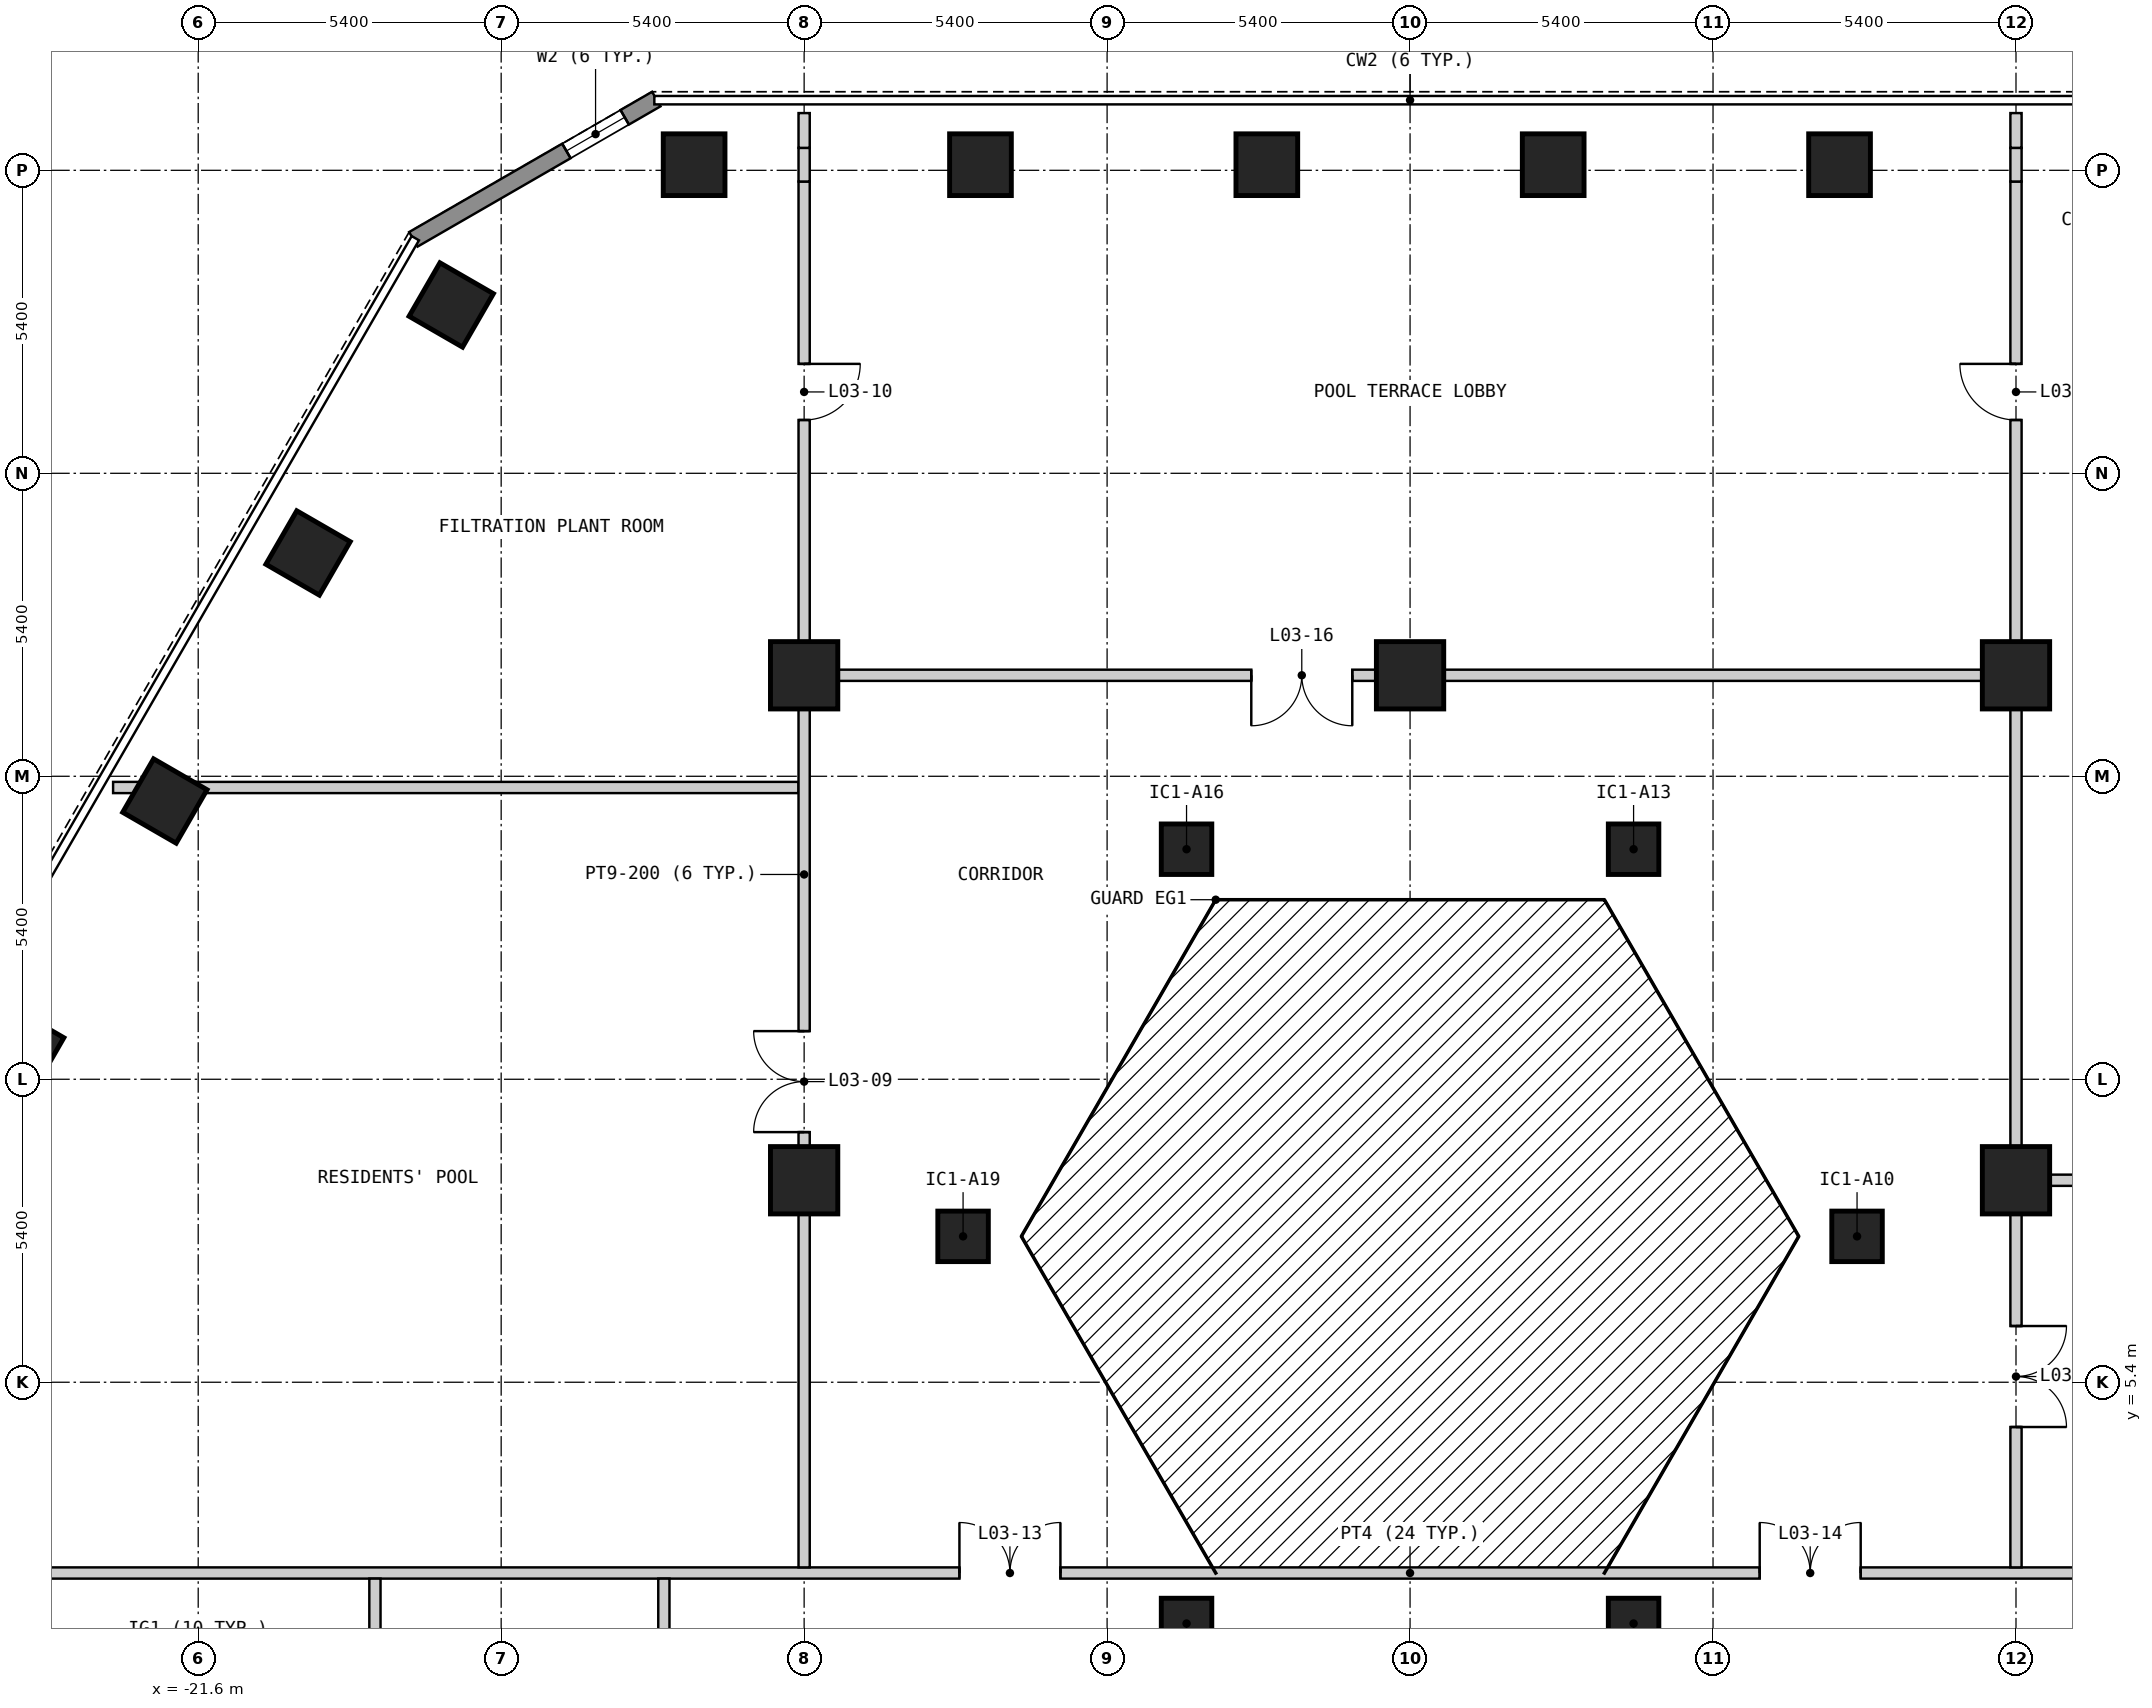
"""IFC4 building model, lengths in metres.
Left out: names, types, materials, properties, quantities, classifications, styles, units other than length and angle.
Written with IfcOpenShell. Run it as: python <this file> out.ifc"""

import sys

from ifc_helpers import new_model, si_unit, direction, frame, frame_2d, origin, origin_2d, place, context, subcontext, project, spatial, polyline, rectangle, outline, extrude, element, fill, save


model = new_model("IFC4")
c1 = context("Model", 3, precision=1e-05, world=origin(), true_north=direction((0.0, 1.0)))
c2 = subcontext(c1, "Body", "Model", "MODEL_VIEW")
j1 = project(units=[si_unit("LENGTHUNIT", "METRE"), si_unit("PLANEANGLEUNIT", "RADIAN")], contexts=[c1])
p1 = place(None, origin())
s1 = spatial("IfcSite", under=j1, at=p1, CompositionType="ELEMENT")
p2 = place(p1, origin())
s2 = spatial("IfcBuilding", under=s1, at=p2, CompositionType="ELEMENT")
p3 = place(p2, frame((0.0, 0.0, 12.6)))
s3 = spatial("IfcBuildingStorey", under=s2, at=p3, CompositionType="ELEMENT", Elevation=12.6)
for number, where, z_axis, x_axis in (
    (1, (7.655, 27.1, 0.0), (0.0, 0.0, 1.0), (-1.0, 0.0, 0.0)),
    (2, (2.551, 27.1, 0.0), (0.0, 0.0, 1.0), (-1.0, 0.0, 0.0)),
    (3, (-2.553, 27.1, 0.0), (0.0, 0.0, 1.0), (-1.0, 0.0, 0.0)),
    (4, (-7.657, 27.1, 0.0), (0.0, 0.0, 1.0), (-1.0, 0.0, 0.0)),
    (5, (-12.761, 27.1, 0.0), (0.0, 0.0, 1.0), (-1.0, 0.0, 0.0)),
    (6, (-17.09, 24.6, 0.0), (0.0, 0.0, 1.0), (-0.5, -0.866, 0.0)),
    (7, (-19.642, 20.18, 0.0), (0.0, 0.0, 1.0), (-0.5, -0.866, 0.0)),
    (8, (-22.194, 15.759, 0.0), (0.0, 0.0, 1.0), (-0.5, -0.866, 0.0)),
    (9, (-24.746, 11.339, 0.0), (0.0, 0.0, 1.0), (-0.5, -0.866, 0.0)),
):
    element("IfcColumn", number, at=place(p3, frame(where, z_axis=z_axis, x_axis=x_axis)), inside=s3, PredefinedType="COLUMN", context=c2, shape_type="SweptSolid", body=[
        extrude(rectangle(XDim=1.1, YDim=1.1, at=origin_2d()), origin(), (0.0, 0.0, 1.0), 3.6),
    ])
for number, where, z_axis, x_axis in (
    (10, (3.984, 1.1, 0.0), (0.0, 0.0, 1.0), (1.0, 0.0, 0.0)),
    (11, (7.967, 8.0, 0.0), (0.0, 0.0, 1.0), (1.0, 0.0, 0.0)),
    (12, (3.984, 14.9, 0.0), (0.0, 0.0, 1.0), (1.0, 0.0, 0.0)),
    (13, (-3.984, 14.9, 0.0), (0.0, 0.0, 1.0), (1.0, 0.0, 0.0)),
    (14, (-7.967, 8.0, 0.0), (0.0, 0.0, 1.0), (1.0, 0.0, 0.0)),
    (15, (-3.984, 1.1, 0.0), (0.0, 0.0, 1.0), (1.0, 0.0, 0.0)),
):
    element("IfcColumn", number, at=place(p3, frame(where, z_axis=z_axis, x_axis=x_axis)), inside=s3, PredefinedType="COLUMN", context=c2, shape_type="SweptSolid", body=[
        extrude(rectangle(XDim=0.9, YDim=0.9, at=origin_2d()), origin(), (0.0, 0.0, 1.0), 3.6),
    ])
for number, where, z_axis, x_axis in (
    (16, (-10.8, 9.0, 0.0), (0.0, 0.0, 1.0), (1.0, 0.0, 0.0)),
    (17, (-10.8, 18.0, 0.0), (0.0, 0.0, 1.0), (1.0, 0.0, 0.0)),
    (18, (0.0, 18.0, 0.0), (0.0, 0.0, 1.0), (1.0, 0.0, 0.0)),
    (19, (10.8, 9.0, 0.0), (0.0, 0.0, 1.0), (1.0, 0.0, 0.0)),
    (20, (10.8, 18.0, 0.0), (0.0, 0.0, 1.0), (1.0, 0.0, 0.0)),
):
    element("IfcColumn", number, at=place(p3, frame(where, z_axis=z_axis, x_axis=x_axis)), inside=s3, PredefinedType="COLUMN", context=c2, shape_type="SweptSolid", body=[
        extrude(rectangle(XDim=1.2, YDim=1.2, at=origin_2d()), origin(), (0.0, 0.0, 1.0), 3.6),
    ])
p4 = place(p3, frame((-13.435, 28.27, 0.0), z_axis=(0.0, 0.0, 1.0), x_axis=(-0.866010750942, -0.50002537861, 0.0)))
e21 = element("IfcWall", 21, at=p4, inside=s3, PredefinedType="SOLIDWALL", context=c2, shape_type="SweptSolid", body=[
    extrude(outline(polyline([(0.0, -0.15), (5.0, -0.15), (4.919, 0.15), (0.08, 0.15), (0.0, -0.15)])), origin(), (0.0, 0.0, 1.0), 3.25),
])
p5 = place(p4, frame((0.65, 0.0, 0.15)))
e22 = element("IfcOpeningElement", 22, at=p5, cuts=e21, PredefinedType="OPENING", context=c2, shape_type="SweptSolid", body=[
    extrude(rectangle(XDim=1.2, YDim=2.1, at=frame_2d((0.6, 1.05))), frame((0.0, 0.16, 0.0), z_axis=(0.0, -1.0, 0.0), x_axis=(1.0, 0.0, 0.0)), (0.0, 0.0, 1.0), 0.32),
])
p6 = place(p3, frame((-29.549, 2.0, 0.0), z_axis=(0.0, 0.0, 1.0), x_axis=(1.0, 0.0, 0.0)))
e23 = element("IfcWall", 23, at=p6, inside=s3, PredefinedType="PARTITIONING", context=c2, shape_type="SweptSolid", body=[
    extrude(rectangle(XDim=59.097, YDim=0.2, at=frame_2d((29.549, 0.0))), origin(), (0.0, 0.0, 1.0), 3.25),
])
p7 = place(p6, frame((21.517, 0.0, 0.0)))
e24 = element("IfcOpeningElement", 24, at=p7, cuts=e23, PredefinedType="OPENING", context=c2, shape_type="SweptSolid", body=[
    extrude(rectangle(XDim=1.8, YDim=2.1, at=frame_2d((0.9, 1.05))), frame((0.0, 0.11, 0.0), z_axis=(0.0, -1.0, 0.0), x_axis=(1.0, 0.0, 0.0)), (0.0, 0.0, 1.0), 0.22),
])
p8 = place(p6, frame((35.781, 0.0, 0.0)))
e25 = element("IfcOpeningElement", 25, at=p8, cuts=e23, PredefinedType="OPENING", context=c2, shape_type="SweptSolid", body=[
    extrude(rectangle(XDim=1.8, YDim=2.1, at=frame_2d((0.9, 1.05))), frame((0.0, 0.11, 0.0), z_axis=(0.0, -1.0, 0.0), x_axis=(1.0, 0.0, 0.0)), (0.0, 0.0, 1.0), 0.22),
])
p9 = place(p3, frame((10.9, 9.0, 0.0), z_axis=(0.0, 0.0, 1.0), x_axis=(1.0, 0.0, 0.0)))
e26 = element("IfcWall", 26, at=p9, inside=s3, PredefinedType="PARTITIONING", context=c2, shape_type="SweptSolid", body=[
    extrude(rectangle(XDim=14.792, YDim=0.2, at=frame_2d((7.396, 0.0))), origin(), (0.0, 0.0, 1.0), 3.25),
])
p10 = place(p3, frame((-23.117, 16.0, 0.0), z_axis=(0.0, 0.0, 1.0), x_axis=(1.0, 0.0, 0.0)))
e27 = element("IfcWall", 27, at=p10, inside=s3, PredefinedType="SOLIDWALL", context=c2, shape_type="SweptSolid", body=[
    extrude(rectangle(XDim=0.663, YDim=0.2, at=frame_2d((0.332, 0.0))), origin(), (0.0, 0.0, 1.0), 3.25),
])
p11 = place(p3, frame((-22.454, 16.0, 0.0), z_axis=(0.0, 0.0, 1.0), x_axis=(1.0, 0.0, 0.0)))
e28 = element("IfcWall", 28, at=p11, inside=s3, PredefinedType="SOLIDWALL", context=c2, shape_type="SweptSolid", body=[
    extrude(rectangle(XDim=0.803, YDim=0.2, at=frame_2d((0.402, 0.0))), origin(), (0.0, 0.0, 1.0), 2.52),
])
p12 = place(p3, frame((-21.651, 16.0, 0.0), z_axis=(0.0, 0.0, 1.0), x_axis=(1.0, 0.0, 0.0)))
e29 = element("IfcWall", 29, at=p12, inside=s3, PredefinedType="SOLIDWALL", context=c2, shape_type="SweptSolid", body=[
    extrude(rectangle(XDim=10.751, YDim=0.2, at=frame_2d((5.375, 0.0))), origin(), (0.0, 0.0, 1.0), 3.25),
])
p13 = place(p3, frame((-10.7, 18.0, 0.0), z_axis=(0.0, 0.0, 1.0), x_axis=(1.0, 0.0, 0.0)))
e30 = element("IfcWall", 30, at=p13, inside=s3, PredefinedType="PARTITIONING", context=c2, shape_type="SweptSolid", body=[
    extrude(rectangle(XDim=21.4, YDim=0.2, at=frame_2d((10.7, 0.0))), origin(), (0.0, 0.0, 1.0), 3.25),
])
p14 = place(p13, frame((9.67, 0.0, 0.0), z_axis=(0.0, 0.0, 1.0), x_axis=(-1.0, 0.0, 0.0)))
e31 = element("IfcOpeningElement", 31, at=p14, cuts=e30, PredefinedType="OPENING", context=c2, shape_type="SweptSolid", body=[
    extrude(rectangle(XDim=1.8, YDim=2.1, at=frame_2d((0.9, 1.05))), frame((0.0, 0.11, 0.0), z_axis=(0.0, -1.0, 0.0), x_axis=(1.0, 0.0, 0.0)), (0.0, 0.0, 1.0), 0.22),
])
p15 = place(p3, frame((-18.45, -21.471, 0.0), z_axis=(0.0, 0.0, 1.0), x_axis=(0.0, 1.0, 0.0)))
e32 = element("IfcWall", 32, at=p15, inside=s3, PredefinedType="PARTITIONING", context=c2, shape_type="SweptSolid", body=[
    extrude(rectangle(XDim=23.371, YDim=0.2, at=frame_2d((11.686, 0.0))), origin(), (0.0, 0.0, 1.0), 3.25),
])
p16 = place(p15, frame((5.873, 0.0, 0.0)))
e33 = element("IfcOpeningElement", 33, at=p16, cuts=e32, PredefinedType="OPENING", context=c2, shape_type="SweptSolid", body=[
    extrude(rectangle(XDim=1.0, YDim=2.1, at=frame_2d((0.5, 1.05))), frame((0.0, 0.11, 0.0), z_axis=(0.0, -1.0, 0.0), x_axis=(1.0, 0.0, 0.0)), (0.0, 0.0, 1.0), 0.22),
])
p17 = place(p15, frame((17.469, 0.0, 0.0)))
e34 = element("IfcOpeningElement", 34, at=p17, cuts=e32, PredefinedType="OPENING", context=c2, shape_type="SweptSolid", body=[
    extrude(rectangle(XDim=1.0, YDim=2.1, at=frame_2d((0.5, 1.05))), frame((0.0, 0.11, 0.0), z_axis=(0.0, -1.0, 0.0), x_axis=(1.0, 0.0, 0.0)), (0.0, 0.0, 1.0), 0.22),
])
p18 = place(p3, frame((-13.3, -4.88, 0.0), z_axis=(0.0, 0.0, 1.0), x_axis=(0.0, 1.0, 0.0)))
e35 = element("IfcWall", 35, at=p18, inside=s3, PredefinedType="PARTITIONING", context=c2, shape_type="SweptSolid", body=[
    extrude(rectangle(XDim=6.78, YDim=0.2, at=frame_2d((3.39, 0.0))), origin(), (0.0, 0.0, 1.0), 3.25),
])
p19 = place(p3, frame((-10.8, 2.1, 0.0), z_axis=(0.0, 0.0, 1.0), x_axis=(0.0, 1.0, 0.0)))
e36 = element("IfcWall", 36, at=p19, inside=s3, PredefinedType="SOLIDWALL", context=c2, shape_type="SweptSolid", body=[
    extrude(rectangle(XDim=24.7, YDim=0.2, at=frame_2d((12.35, 0.0))), origin(), (0.0, 0.0, 1.0), 3.25),
])
p20 = place(p19, frame((7.758, 0.0, 0.0)))
e37 = element("IfcOpeningElement", 37, at=p20, cuts=e36, PredefinedType="OPENING", context=c2, shape_type="SweptSolid", body=[
    extrude(rectangle(XDim=1.8, YDim=2.1, at=frame_2d((0.9, 1.05))), frame((0.0, 0.11, 0.0), z_axis=(0.0, -1.0, 0.0), x_axis=(1.0, 0.0, 0.0)), (0.0, 0.0, 1.0), 0.22),
])
p21 = place(p19, frame((20.45, 0.0, 0.0)))
e38 = element("IfcOpeningElement", 38, at=p21, cuts=e36, PredefinedType="OPENING", context=c2, shape_type="SweptSolid", body=[
    extrude(rectangle(XDim=1.0, YDim=2.1, at=frame_2d((0.5, 1.05))), frame((0.0, 0.11, 0.0), z_axis=(0.0, -1.0, 0.0), x_axis=(1.0, 0.0, 0.0)), (0.0, 0.0, 1.0), 0.22),
])
p22 = place(p3, frame((-10.8, 26.8, 0.0), z_axis=(0.0, 0.0, 1.0), x_axis=(0.0, 1.0, 0.0)))
e39 = element("IfcWall", 39, at=p22, inside=s3, PredefinedType="SOLIDWALL", context=c2, shape_type="SweptSolid", body=[
    extrude(rectangle(XDim=0.6, YDim=0.2, at=frame_2d((0.3, 0.0))), origin(), (0.0, 0.0, 1.0), 2.52),
])
p23 = place(p3, frame((-10.8, 27.4, 0.0), z_axis=(0.0, 0.0, 1.0), x_axis=(0.0, 1.0, 0.0)))
e40 = element("IfcWall", 40, at=p23, inside=s3, PredefinedType="SOLIDWALL", context=c2, shape_type="SweptSolid", body=[
    extrude(rectangle(XDim=0.62, YDim=0.2, at=frame_2d((0.31, 0.0))), origin(), (0.0, 0.0, 1.0), 3.25),
])
p24 = place(p3, frame((10.8, 2.1, 0.0), z_axis=(0.0, 0.0, 1.0), x_axis=(0.0, 1.0, 0.0)))
e41 = element("IfcWall", 41, at=p24, inside=s3, PredefinedType="PARTITIONING", context=c2, shape_type="SweptSolid", body=[
    extrude(rectangle(XDim=24.7, YDim=0.2, at=frame_2d((12.35, 0.0))), origin(), (0.0, 0.0, 1.0), 3.25),
])
p25 = place(p24, frame((4.302, 0.0, 0.0), z_axis=(0.0, 0.0, 1.0), x_axis=(-1.0, 0.0, 0.0)))
e42 = element("IfcOpeningElement", 42, at=p25, cuts=e41, PredefinedType="OPENING", context=c2, shape_type="SweptSolid", body=[
    extrude(rectangle(XDim=1.8, YDim=2.1, at=frame_2d((0.9, 1.05))), frame((0.0, 0.11, 0.0), z_axis=(0.0, -1.0, 0.0), x_axis=(1.0, 0.0, 0.0)), (0.0, 0.0, 1.0), 0.22),
])
p26 = place(p24, frame((21.45, 0.0, 0.0), z_axis=(0.0, 0.0, 1.0), x_axis=(-1.0, 0.0, 0.0)))
e43 = element("IfcOpeningElement", 43, at=p26, cuts=e41, PredefinedType="OPENING", context=c2, shape_type="SweptSolid", body=[
    extrude(rectangle(XDim=1.0, YDim=2.1, at=frame_2d((0.5, 1.05))), frame((0.0, 0.11, 0.0), z_axis=(0.0, -1.0, 0.0), x_axis=(1.0, 0.0, 0.0)), (0.0, 0.0, 1.0), 0.22),
])
p27 = place(p3, frame((10.8, 26.8, 0.0), z_axis=(0.0, 0.0, 1.0), x_axis=(0.0, 1.0, 0.0)))
e44 = element("IfcWall", 44, at=p27, inside=s3, PredefinedType="PARTITIONING", context=c2, shape_type="SweptSolid", body=[
    extrude(rectangle(XDim=0.6, YDim=0.2, at=frame_2d((0.3, 0.0))), origin(), (0.0, 0.0, 1.0), 2.52),
])
p28 = place(p3, frame((10.8, 27.4, 0.0), z_axis=(0.0, 0.0, 1.0), x_axis=(0.0, 1.0, 0.0)))
e45 = element("IfcWall", 45, at=p28, inside=s3, PredefinedType="PARTITIONING", context=c2, shape_type="SweptSolid", body=[
    extrude(rectangle(XDim=0.62, YDim=0.2, at=frame_2d((0.31, 0.0))), origin(), (0.0, 0.0, 1.0), 3.25),
])
p29 = place(p5, origin())
e46 = element("IfcWindow", 46, at=p29, inside=s3, PartitioningType="SINGLE_PANEL", PredefinedType="WINDOW", context=c2, shape_type="SweptSolid", body=[
    extrude(rectangle(XDim=1.2, YDim=2.1, at=frame_2d((0.6, 1.05))), frame((0.0, 0.03, 0.0), z_axis=(0.0, -1.0, 0.0), x_axis=(1.0, 0.0, 0.0)), (0.0, 0.0, 1.0), 0.06),
])
fill(e22, e46)
p30 = place(p20, origin())
e47 = element("IfcDoor", 47, at=p30, inside=s3, OperationType="DOUBLE_DOOR_SINGLE_SWING", PredefinedType="DOOR", context=c2, shape_type="SweptSolid", body=[
    extrude(rectangle(XDim=1.8, YDim=2.1, at=frame_2d((0.9, 1.05))), frame((0.0, 0.025, 0.0), z_axis=(0.0, -1.0, 0.0), x_axis=(1.0, 0.0, 0.0)), (0.0, 0.0, 1.0), 0.05),
])
fill(e37, e47)
p31 = place(p21, origin())
e48 = element("IfcDoor", 48, at=p31, inside=s3, OperationType="SINGLE_SWING_RIGHT", PredefinedType="DOOR", context=c2, shape_type="SweptSolid", body=[
    extrude(rectangle(XDim=1.0, YDim=2.1, at=frame_2d((0.5, 1.05))), frame((0.0, 0.025, 0.0), z_axis=(0.0, -1.0, 0.0), x_axis=(1.0, 0.0, 0.0)), (0.0, 0.0, 1.0), 0.05),
])
fill(e38, e48)
p32 = place(p25, origin())
e49 = element("IfcDoor", 49, at=p32, inside=s3, OperationType="DOUBLE_DOOR_SINGLE_SWING", PredefinedType="DOOR", context=c2, shape_type="SweptSolid", body=[
    extrude(rectangle(XDim=1.8, YDim=2.1, at=frame_2d((0.9, 1.05))), frame((0.0, 0.025, 0.0), z_axis=(0.0, -1.0, 0.0), x_axis=(1.0, 0.0, 0.0)), (0.0, 0.0, 1.0), 0.05),
])
fill(e42, e49)
p33 = place(p26, origin())
e50 = element("IfcDoor", 50, at=p33, inside=s3, OperationType="SINGLE_SWING_LEFT", PredefinedType="DOOR", context=c2, shape_type="SweptSolid", body=[
    extrude(rectangle(XDim=1.0, YDim=2.1, at=frame_2d((0.5, 1.05))), frame((0.0, 0.025, 0.0), z_axis=(0.0, -1.0, 0.0), x_axis=(1.0, 0.0, 0.0)), (0.0, 0.0, 1.0), 0.05),
])
fill(e43, e50)
p34 = place(p7, origin())
e51 = element("IfcDoor", 51, at=p34, inside=s3, OperationType="DOUBLE_DOOR_SINGLE_SWING", PredefinedType="DOOR", context=c2, shape_type="SweptSolid", body=[
    extrude(rectangle(XDim=1.8, YDim=2.1, at=frame_2d((0.9, 1.05))), frame((0.0, 0.025, 0.0), z_axis=(0.0, -1.0, 0.0), x_axis=(1.0, 0.0, 0.0)), (0.0, 0.0, 1.0), 0.05),
])
fill(e24, e51)
p35 = place(p8, origin())
e52 = element("IfcDoor", 52, at=p35, inside=s3, OperationType="DOUBLE_DOOR_SINGLE_SWING", PredefinedType="DOOR", context=c2, shape_type="SweptSolid", body=[
    extrude(rectangle(XDim=1.8, YDim=2.1, at=frame_2d((0.9, 1.05))), frame((0.0, 0.025, 0.0), z_axis=(0.0, -1.0, 0.0), x_axis=(1.0, 0.0, 0.0)), (0.0, 0.0, 1.0), 0.05),
])
fill(e25, e52)
p36 = place(p14, origin())
e53 = element("IfcDoor", 53, at=p36, inside=s3, OperationType="DOUBLE_DOOR_SINGLE_SWING", PredefinedType="DOOR", context=c2, shape_type="SweptSolid", body=[
    extrude(rectangle(XDim=1.8, YDim=2.1, at=frame_2d((0.9, 1.05))), frame((0.0, 0.025, 0.0), z_axis=(0.0, -1.0, 0.0), x_axis=(1.0, 0.0, 0.0)), (0.0, 0.0, 1.0), 0.05),
])
fill(e31, e53)
save(model, sys.argv[1])
